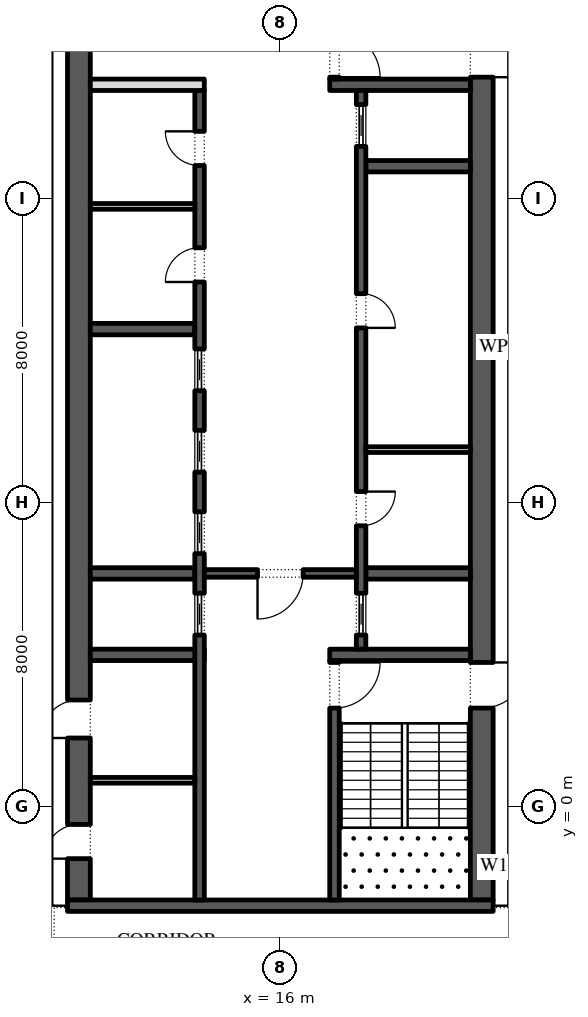
"""IFC4 building model, lengths in metres.
Left out: names, types, materials, properties, quantities, classifications, styles, units other than length and angle.
Written with IfcOpenShell. Run it as: python <this file> out.ifc"""

import sys

from ifc_helpers import new_model, si_unit, direction, frame, frame_2d, origin, place, context, subcontext, project, spatial, rectangle, extrude, element, fill, save


model = new_model("IFC4")
c1 = context("Model", 3, precision=1e-05, world=origin(), true_north=direction((0.0, 1.0)))
c2 = subcontext(c1, "Body", "Model", "MODEL_VIEW")
j1 = project(units=[si_unit("LENGTHUNIT", "METRE"), si_unit("PLANEANGLEUNIT", "RADIAN")], contexts=[c1])
p1 = place(None, origin())
s1 = spatial("IfcSite", under=j1, at=p1, CompositionType="ELEMENT")
p2 = place(p1, origin())
s2 = spatial("IfcBuilding", under=s1, at=p2, CompositionType="ELEMENT")
p3 = place(p2, frame((0.0, 0.0, 285.0)))
s3 = spatial("IfcBuildingStorey", under=s2, at=p3, CompositionType="ELEMENT", Elevation=285.0)
p4 = place(p3, frame((21.359, -11.678, 0.0), z_axis=(0.0, 0.0, 1.0), x_axis=(0.224949198343, 0.974370493275, 0.0)))
e1 = element("IfcWall", 1, at=p4, inside=s3, PredefinedType="STANDARD", context=c2, shape_type="SweptSolid", body=[
    extrude(rectangle(XDim=49.5, YDim=0.3, at=frame_2d((24.75, 0.0))), origin(), (0.0, 0.0, 1.0), 4.0),
])
p5 = place(p4, frame((1.157, 0.0, 0.45)))
e2 = element("IfcOpeningElement", 2, at=p5, cuts=e1, PredefinedType="OPENING", context=c2, shape_type="SweptSolid", body=[
    extrude(rectangle(XDim=4.5, YDim=3.05, at=frame_2d((2.25, 1.525))), frame((0.0, 0.16, 0.0), z_axis=(0.0, -1.0, 0.0), x_axis=(1.0, 0.0, 0.0)), (0.0, 0.0, 1.0), 0.32),
])
p6 = place(p4, frame((8.121, 0.0, 0.45)))
e3 = element("IfcOpeningElement", 3, at=p6, cuts=e1, PredefinedType="OPENING", context=c2, shape_type="SweptSolid", body=[
    extrude(rectangle(XDim=4.5, YDim=3.05, at=frame_2d((2.25, 1.525))), frame((0.0, 0.16, 0.0), z_axis=(0.0, -1.0, 0.0), x_axis=(1.0, 0.0, 0.0)), (0.0, 0.0, 1.0), 0.32),
])
p7 = place(p4, frame((15.236, 0.0, 0.45)))
e4 = element("IfcOpeningElement", 4, at=p7, cuts=e1, PredefinedType="OPENING", context=c2, shape_type="SweptSolid", body=[
    extrude(rectangle(XDim=4.5, YDim=3.05, at=frame_2d((2.25, 1.525))), frame((0.0, 0.16, 0.0), z_axis=(0.0, -1.0, 0.0), x_axis=(1.0, 0.0, 0.0)), (0.0, 0.0, 1.0), 0.32),
])
p8 = place(p4, frame((22.35, 0.0, 0.45)))
e5 = element("IfcOpeningElement", 5, at=p8, cuts=e1, PredefinedType="OPENING", context=c2, shape_type="SweptSolid", body=[
    extrude(rectangle(XDim=4.5, YDim=3.05, at=frame_2d((2.25, 1.525))), frame((0.0, 0.16, 0.0), z_axis=(0.0, -1.0, 0.0), x_axis=(1.0, 0.0, 0.0)), (0.0, 0.0, 1.0), 0.32),
])
p9 = place(p4, frame((29.464, 0.0, 0.45)))
e6 = element("IfcOpeningElement", 6, at=p9, cuts=e1, PredefinedType="OPENING", context=c2, shape_type="SweptSolid", body=[
    extrude(rectangle(XDim=4.5, YDim=2.95, at=frame_2d((2.25, 1.475))), frame((0.0, 0.16, 0.0), z_axis=(0.0, -1.0, 0.0), x_axis=(1.0, 0.0, 0.0)), (0.0, 0.0, 1.0), 0.32),
])
p10 = place(p4, frame((37.628, 0.0, 0.0)))
e7 = element("IfcOpeningElement", 7, at=p10, cuts=e1, PredefinedType="OPENING", context=c2, shape_type="SweptSolid", body=[
    extrude(rectangle(XDim=2.4, YDim=3.325, at=frame_2d((1.2, 1.663))), frame((0.0, 0.16, 0.0), z_axis=(0.0, -1.0, 0.0), x_axis=(1.0, 0.0, 0.0)), (0.0, 0.0, 1.0), 0.32),
])
p11 = place(p4, frame((43.693, 0.0, 0.45)))
e8 = element("IfcOpeningElement", 8, at=p11, cuts=e1, PredefinedType="OPENING", context=c2, shape_type="SweptSolid", body=[
    extrude(rectangle(XDim=4.5, YDim=3.05, at=frame_2d((2.25, 1.525))), frame((0.0, 0.16, 0.0), z_axis=(0.0, -1.0, 0.0), x_axis=(1.0, 0.0, 0.0)), (0.0, 0.0, 1.0), 0.32),
])
p12 = place(p3, frame((21.3, -2.45, 0.0), z_axis=(0.0, 0.0, 1.0), x_axis=(0.0, 1.0, 0.0)))
e9 = element("IfcWall", 9, at=p12, inside=s3, PredefinedType="SHEAR", context=c2, shape_type="SweptSolid", body=[
    extrude(rectangle(XDim=27.9, YDim=0.6, at=frame_2d((13.95, 0.0))), origin(), (0.0, 0.0, 1.0), 4.0),
])
p13 = place(p12, frame((5.05, 0.0, 0.0)))
e10 = element("IfcOpeningElement", 10, at=p13, cuts=e9, PredefinedType="OPENING", context=c2, shape_type="SweptSolid", body=[
    extrude(rectangle(XDim=1.2, YDim=2.1, at=frame_2d((0.6, 1.05))), frame((0.0, 0.31, 0.0), z_axis=(0.0, -1.0, 0.0), x_axis=(1.0, 0.0, 0.0)), (0.0, 0.0, 1.0), 0.62),
])
p14 = place(p12, frame((21.65, 0.0, 0.0)))
e11 = element("IfcOpeningElement", 11, at=p14, cuts=e9, PredefinedType="OPENING", context=c2, shape_type="SweptSolid", body=[
    extrude(rectangle(XDim=1.2, YDim=2.1, at=frame_2d((0.6, 1.05))), frame((0.0, 0.31, 0.0), z_axis=(0.0, -1.0, 0.0), x_axis=(1.0, 0.0, 0.0)), (0.0, 0.0, 1.0), 0.62),
])
p15 = place(p3, frame((10.7, -2.45, 0.0), z_axis=(0.0, 0.0, 1.0), x_axis=(0.0, 1.0, 0.0)))
e12 = element("IfcWall", 12, at=p15, inside=s3, PredefinedType="SHEAR", context=c2, shape_type="SweptSolid", body=[
    extrude(rectangle(XDim=27.9, YDim=0.6, at=frame_2d((13.95, 0.0))), origin(), (0.0, 0.0, 1.0), 4.0),
])
p16 = place(p15, frame((23.65, 0.0, 0.0)))
e13 = element("IfcOpeningElement", 13, at=p16, cuts=e12, PredefinedType="OPENING", context=c2, shape_type="SweptSolid", body=[
    extrude(rectangle(XDim=2.4, YDim=2.1, at=frame_2d((1.2, 1.05))), frame((0.0, 0.31, 0.0), z_axis=(0.0, -1.0, 0.0), x_axis=(1.0, 0.0, 0.0)), (0.0, 0.0, 1.0), 0.62),
])
p17 = place(p15, frame((1.087, 0.0, 0.0)))
e14 = element("IfcOpeningElement", 14, at=p17, cuts=e12, PredefinedType="OPENING", context=c2, shape_type="SweptSolid", body=[
    extrude(rectangle(XDim=0.9, YDim=2.1, at=frame_2d((0.45, 1.05))), frame((0.0, 0.31, 0.0), z_axis=(0.0, -1.0, 0.0), x_axis=(1.0, 0.0, 0.0)), (0.0, 0.0, 1.0), 0.62),
])
p18 = place(p15, frame((4.262, 0.0, 0.0)))
e15 = element("IfcOpeningElement", 15, at=p18, cuts=e12, PredefinedType="OPENING", context=c2, shape_type="SweptSolid", body=[
    extrude(rectangle(XDim=1.0, YDim=2.1, at=frame_2d((0.5, 1.05))), frame((0.0, 0.31, 0.0), z_axis=(0.0, -1.0, 0.0), x_axis=(1.0, 0.0, 0.0)), (0.0, 0.0, 1.0), 0.62),
])
p19 = place(p3, frame((10.4, -2.6, 0.0), z_axis=(0.0, 0.0, 1.0), x_axis=(1.0, 0.0, 0.0)))
e16 = element("IfcWall", 16, at=p19, inside=s3, PredefinedType="SHEAR", context=c2, shape_type="SweptSolid", body=[
    extrude(rectangle(XDim=11.2, YDim=0.3, at=frame_2d((5.6, 0.0))), origin(), (0.0, 0.0, 1.0), 4.0),
])
p20 = place(p3, frame((17.3, 4.0, 0.0), z_axis=(0.0, 0.0, 1.0), x_axis=(1.0, 0.0, 0.0)))
e17 = element("IfcWall", 17, at=p20, inside=s3, PredefinedType="SHEAR", context=c2, shape_type="SweptSolid", body=[
    extrude(rectangle(XDim=3.7, YDim=0.3, at=frame_2d((1.85, 0.0))), origin(), (0.0, 0.0, 1.0), 4.0),
])
p21 = place(p3, frame((17.425, -2.45, 0.0), z_axis=(0.0, 0.0, 1.0), x_axis=(0.0, 1.0, 0.0)))
e18 = element("IfcWall", 18, at=p21, inside=s3, PredefinedType="SHEAR", context=c2, shape_type="SweptSolid", body=[
    extrude(rectangle(XDim=6.3, YDim=0.25, at=frame_2d((3.15, 0.0))), origin(), (0.0, 0.0, 1.0), 4.0),
])
p22 = place(p21, frame((5.05, 0.0, 0.0)))
e19 = element("IfcOpeningElement", 19, at=p22, cuts=e18, PredefinedType="OPENING", context=c2, shape_type="SweptSolid", body=[
    extrude(rectangle(XDim=1.2, YDim=2.1, at=frame_2d((0.6, 1.05))), frame((0.0, 0.135, 0.0), z_axis=(0.0, -1.0, 0.0), x_axis=(1.0, 0.0, 0.0)), (0.0, 0.0, 1.0), 0.27),
])
p23 = place(p3, frame((17.3, 19.0, 0.0), z_axis=(0.0, 0.0, 1.0), x_axis=(1.0, 0.0, 0.0)))
e20 = element("IfcWall", 20, at=p23, inside=s3, PredefinedType="SHEAR", context=c2, shape_type="SweptSolid", body=[
    extrude(rectangle(XDim=3.7, YDim=0.3, at=frame_2d((1.85, 0.0))), origin(), (0.0, 0.0, 1.0), 4.0),
])
p24 = place(p3, frame((17.425, 19.15, 0.0), z_axis=(0.0, 0.0, 1.0), x_axis=(0.0, 1.0, 0.0)))
e21 = element("IfcWall", 21, at=p24, inside=s3, PredefinedType="SHEAR", context=c2, shape_type="SweptSolid", body=[
    extrude(rectangle(XDim=6.3, YDim=0.25, at=frame_2d((3.15, 0.0))), origin(), (0.0, 0.0, 1.0), 4.0),
])
p25 = place(p24, frame((0.05, 0.0, 0.0)))
e22 = element("IfcOpeningElement", 22, at=p25, cuts=e21, PredefinedType="OPENING", context=c2, shape_type="SweptSolid", body=[
    extrude(rectangle(XDim=1.2, YDim=2.1, at=frame_2d((0.6, 1.05))), frame((0.0, 0.135, 0.0), z_axis=(0.0, -1.0, 0.0), x_axis=(1.0, 0.0, 0.0)), (0.0, 0.0, 1.0), 0.27),
])
for number, where, z_axis, x_axis in (
    (23, (18.25, 6.143, 0.0), (0.0, 0.0, 1.0), (1.0, 0.0, 0.0)),
    (24, (18.25, 16.857, 0.0), (0.0, 0.0, 1.0), (1.0, 0.0, 0.0)),
):
    element("IfcWall", number, at=place(p3, frame(where, z_axis=z_axis, x_axis=x_axis)), inside=s3, PredefinedType="SHEAR", context=c2, shape_type="SweptSolid", body=[
        extrude(rectangle(XDim=2.75, YDim=0.3, at=frame_2d((1.375, 0.0))), origin(), (0.0, 0.0, 1.0), 4.0),
    ])
p26 = place(p3, frame((18.125, 4.15, 0.0), z_axis=(0.0, 0.0, 1.0), x_axis=(0.0, 1.0, 0.0)))
e25 = element("IfcWall", 25, at=p26, inside=s3, PredefinedType="SHEAR", context=c2, shape_type="SweptSolid", body=[
    extrude(rectangle(XDim=14.7, YDim=0.25, at=frame_2d((7.35, 0.0))), origin(), (0.0, 0.0, 1.0), 4.0),
])
p27 = place(p26, frame((3.246, 0.0, 0.0)))
e26 = element("IfcOpeningElement", 26, at=p27, cuts=e25, PredefinedType="OPENING", context=c2, shape_type="SweptSolid", body=[
    extrude(rectangle(XDim=0.9, YDim=2.1, at=frame_2d((0.45, 1.05))), frame((0.0, 0.135, 0.0), z_axis=(0.0, -1.0, 0.0), x_axis=(1.0, 0.0, 0.0)), (0.0, 0.0, 1.0), 0.27),
])
p28 = place(p26, frame((8.454, 0.0, 0.0)))
e27 = element("IfcOpeningElement", 27, at=p28, cuts=e25, PredefinedType="OPENING", context=c2, shape_type="SweptSolid", body=[
    extrude(rectangle(XDim=0.9, YDim=2.1, at=frame_2d((0.45, 1.05))), frame((0.0, 0.135, 0.0), z_axis=(0.0, -1.0, 0.0), x_axis=(1.0, 0.0, 0.0)), (0.0, 0.0, 1.0), 0.27),
])
p29 = place(p26, frame((0.371, 0.0, 0.0)))
e28 = element("IfcOpeningElement", 28, at=p29, cuts=e25, PredefinedType="OPENING", context=c2, shape_type="SweptSolid", body=[
    extrude(rectangle(XDim=1.1, YDim=2.1, at=frame_2d((0.55, 1.05))), frame((0.0, 0.135, 0.0), z_axis=(0.0, -1.0, 0.0), x_axis=(1.0, 0.0, 0.0)), (0.0, 0.0, 1.0), 0.27),
])
p30 = place(p26, frame((13.229, 0.0, 0.0)))
e29 = element("IfcOpeningElement", 29, at=p30, cuts=e25, PredefinedType="OPENING", context=c2, shape_type="SweptSolid", body=[
    extrude(rectangle(XDim=1.1, YDim=2.1, at=frame_2d((0.55, 1.05))), frame((0.0, 0.135, 0.0), z_axis=(0.0, -1.0, 0.0), x_axis=(1.0, 0.0, 0.0)), (0.0, 0.0, 1.0), 0.27),
])
p31 = place(p3, frame((18.25, 9.4, 0.0), z_axis=(0.0, 0.0, 1.0), x_axis=(1.0, 0.0, 0.0)))
e30 = element("IfcWall", 30, at=p31, inside=s3, PredefinedType="PARTITIONING", context=c2, shape_type="SweptSolid", body=[
    extrude(rectangle(XDim=2.75, YDim=0.15, at=frame_2d((1.375, 0.0))), origin(), (0.0, 0.0, 1.0), 4.0),
])
p32 = place(p3, frame((11.0, 4.0, 0.0), z_axis=(0.0, 0.0, 1.0), x_axis=(1.0, 0.0, 0.0)))
e31 = element("IfcWall", 31, at=p32, inside=s3, PredefinedType="SHEAR", context=c2, shape_type="SweptSolid", body=[
    extrude(rectangle(XDim=3.0, YDim=0.3, at=frame_2d((1.5, 0.0))), origin(), (0.0, 0.0, 1.0), 4.0),
])
for number, where, z_axis, x_axis in (
    (32, (11.0, 6.143, 0.0), (0.0, 0.0, 1.0), (1.0, 0.0, 0.0)),
    (33, (11.0, 12.571, 0.0), (0.0, 0.0, 1.0), (1.0, 0.0, 0.0)),
):
    element("IfcWall", number, at=place(p3, frame(where, z_axis=z_axis, x_axis=x_axis)), inside=s3, PredefinedType="SHEAR", context=c2, shape_type="SweptSolid", body=[
        extrude(rectangle(XDim=2.75, YDim=0.3, at=frame_2d((1.375, 0.0))), origin(), (0.0, 0.0, 1.0), 4.0),
    ])
p33 = place(p3, frame((13.875, -2.45, 0.0), z_axis=(0.0, 0.0, 1.0), x_axis=(0.0, 1.0, 0.0)))
e34 = element("IfcWall", 34, at=p33, inside=s3, PredefinedType="SHEAR", context=c2, shape_type="SweptSolid", body=[
    extrude(rectangle(XDim=21.3, YDim=0.25, at=frame_2d((10.65, 0.0))), origin(), (0.0, 0.0, 1.0), 4.0),
])
p34 = place(p33, frame((16.261, 0.0, 0.0)))
e35 = element("IfcOpeningElement", 35, at=p34, cuts=e34, PredefinedType="OPENING", context=c2, shape_type="SweptSolid", body=[
    extrude(rectangle(XDim=0.9, YDim=2.1, at=frame_2d((0.45, 1.05))), frame((0.0, 0.135, 0.0), z_axis=(0.0, -1.0, 0.0), x_axis=(1.0, 0.0, 0.0)), (0.0, 0.0, 1.0), 0.27),
])
p35 = place(p33, frame((19.325, 0.0, 0.0)))
e36 = element("IfcOpeningElement", 36, at=p35, cuts=e34, PredefinedType="OPENING", context=c2, shape_type="SweptSolid", body=[
    extrude(rectangle(XDim=0.9, YDim=2.1, at=frame_2d((0.45, 1.05))), frame((0.0, 0.135, 0.0), z_axis=(0.0, -1.0, 0.0), x_axis=(1.0, 0.0, 0.0)), (0.0, 0.0, 1.0), 0.27),
])
p36 = place(p33, frame((6.971, 0.0, 0.0)))
e37 = element("IfcOpeningElement", 37, at=p36, cuts=e34, PredefinedType="OPENING", context=c2, shape_type="SweptSolid", body=[
    extrude(rectangle(XDim=1.1, YDim=2.1, at=frame_2d((0.55, 1.05))), frame((0.0, 0.135, 0.0), z_axis=(0.0, -1.0, 0.0), x_axis=(1.0, 0.0, 0.0)), (0.0, 0.0, 1.0), 0.27),
])
p37 = place(p33, frame((9.114, 0.0, 0.0)))
e38 = element("IfcOpeningElement", 38, at=p37, cuts=e34, PredefinedType="OPENING", context=c2, shape_type="SweptSolid", body=[
    extrude(rectangle(XDim=1.1, YDim=2.1, at=frame_2d((0.55, 1.05))), frame((0.0, 0.135, 0.0), z_axis=(0.0, -1.0, 0.0), x_axis=(1.0, 0.0, 0.0)), (0.0, 0.0, 1.0), 0.27),
])
p38 = place(p33, frame((11.257, 0.0, 0.0)))
e39 = element("IfcOpeningElement", 39, at=p38, cuts=e34, PredefinedType="OPENING", context=c2, shape_type="SweptSolid", body=[
    extrude(rectangle(XDim=1.1, YDim=2.1, at=frame_2d((0.55, 1.05))), frame((0.0, 0.135, 0.0), z_axis=(0.0, -1.0, 0.0), x_axis=(1.0, 0.0, 0.0)), (0.0, 0.0, 1.0), 0.27),
])
p39 = place(p33, frame((13.4, 0.0, 0.0)))
e40 = element("IfcOpeningElement", 40, at=p39, cuts=e34, PredefinedType="OPENING", context=c2, shape_type="SweptSolid", body=[
    extrude(rectangle(XDim=1.1, YDim=2.1, at=frame_2d((0.55, 1.05))), frame((0.0, 0.135, 0.0), z_axis=(0.0, -1.0, 0.0), x_axis=(1.0, 0.0, 0.0)), (0.0, 0.0, 1.0), 0.27),
])
p40 = place(p3, frame((11.0, 19.0, 0.0), z_axis=(0.0, 0.0, 1.0), x_axis=(1.0, 0.0, 0.0)))
e41 = element("IfcWall", 41, at=p40, inside=s3, PredefinedType="PARTITIONING", context=c2, shape_type="SweptSolid", body=[
    extrude(rectangle(XDim=3.0, YDim=0.3, at=frame_2d((1.5, 0.0))), origin(), (0.0, 0.0, 1.0), 4.0),
])
p41 = place(p3, frame((11.0, 15.8, 0.0), z_axis=(0.0, 0.0, 1.0), x_axis=(1.0, 0.0, 0.0)))
e42 = element("IfcWall", 42, at=p41, inside=s3, PredefinedType="PARTITIONING", context=c2, shape_type="SweptSolid", body=[
    extrude(rectangle(XDim=2.75, YDim=0.15, at=frame_2d((1.375, 0.0))), origin(), (0.0, 0.0, 1.0), 4.0),
])
p42 = place(p3, frame((14.0, 6.143, 0.0), z_axis=(0.0, 0.0, 1.0), x_axis=(1.0, 0.0, 0.0)))
e43 = element("IfcWall", 43, at=p42, inside=s3, PredefinedType="SHEAR", context=c2, shape_type="SweptSolid", body=[
    extrude(rectangle(XDim=4.0, YDim=0.2, at=frame_2d((2.0, 0.0))), origin(), (0.0, 0.0, 1.0), 4.0),
])
p43 = place(p42, frame((1.4, 0.0, 0.0)))
e44 = element("IfcOpeningElement", 44, at=p43, cuts=e43, PredefinedType="OPENING", context=c2, shape_type="SweptSolid", body=[
    extrude(rectangle(XDim=1.2, YDim=2.1, at=frame_2d((0.6, 1.05))), frame((0.0, 0.11, 0.0), z_axis=(0.0, -1.0, 0.0), x_axis=(1.0, 0.0, 0.0)), (0.0, 0.0, 1.0), 0.22),
])
p44 = place(p3, frame((11.0, 0.7, 0.0), z_axis=(0.0, 0.0, 1.0), x_axis=(1.0, 0.0, 0.0)))
e45 = element("IfcWall", 45, at=p44, inside=s3, PredefinedType="PARTITIONING", context=c2, shape_type="SweptSolid", body=[
    extrude(rectangle(XDim=2.75, YDim=0.15, at=frame_2d((1.375, 0.0))), origin(), (0.0, 0.0, 1.0), 4.0),
])
p45 = place(p27, frame((0.9, -0.2, 0.0), z_axis=(0.0, 0.0, 1.0), x_axis=(-1.0, 0.0, 0.0)))
e46 = element("IfcDoor", 46, at=p45, inside=s3, OperationType="SINGLE_SWING_RIGHT", PredefinedType="DOOR", context=c2, shape_type="SweptSolid", body=[
    extrude(rectangle(XDim=0.9, YDim=2.1, at=frame_2d((0.45, 1.05))), frame((0.0, -0.075, 0.0), z_axis=(0.0, -1.0, 0.0), x_axis=(1.0, 0.0, 0.0)), (0.0, 0.0, 1.0), 0.05),
])
fill(e26, e46)
p46 = place(p28, frame((0.9, -0.2, 0.0), z_axis=(0.0, 0.0, 1.0), x_axis=(-1.0, 0.0, 0.0)))
e47 = element("IfcDoor", 47, at=p46, inside=s3, OperationType="SINGLE_SWING_LEFT", PredefinedType="DOOR", context=c2, shape_type="SweptSolid", body=[
    extrude(rectangle(XDim=0.9, YDim=2.1, at=frame_2d((0.45, 1.05))), frame((0.0, -0.075, 0.0), z_axis=(0.0, -1.0, 0.0), x_axis=(1.0, 0.0, 0.0)), (0.0, 0.0, 1.0), 0.05),
])
fill(e27, e47)
p47 = place(p29, origin())
e48 = element("IfcDoor", 48, at=p47, inside=s3, OperationType="SLIDING_TO_LEFT", PredefinedType="DOOR", context=c2, shape_type="SweptSolid", body=[
    extrude(rectangle(XDim=1.1, YDim=2.1, at=frame_2d((0.55, 1.05))), frame((0.0, 0.025, 0.0), z_axis=(0.0, -1.0, 0.0), x_axis=(1.0, 0.0, 0.0)), (0.0, 0.0, 1.0), 0.05),
])
fill(e28, e48)
p48 = place(p30, origin())
e49 = element("IfcDoor", 49, at=p48, inside=s3, OperationType="SLIDING_TO_LEFT", PredefinedType="DOOR", context=c2, shape_type="SweptSolid", body=[
    extrude(rectangle(XDim=1.1, YDim=2.1, at=frame_2d((0.55, 1.05))), frame((0.0, 0.025, 0.0), z_axis=(0.0, -1.0, 0.0), x_axis=(1.0, 0.0, 0.0)), (0.0, 0.0, 1.0), 0.05),
])
fill(e29, e49)
p49 = place(p34, origin())
e50 = element("IfcDoor", 50, at=p49, inside=s3, OperationType="SINGLE_SWING_RIGHT", PredefinedType="DOOR", context=c2, shape_type="SweptSolid", body=[
    extrude(rectangle(XDim=0.9, YDim=2.1, at=frame_2d((0.45, 1.05))), frame((0.0, 0.125, 0.0), z_axis=(0.0, -1.0, 0.0), x_axis=(1.0, 0.0, 0.0)), (0.0, 0.0, 1.0), 0.05),
])
fill(e35, e50)
p50 = place(p35, origin())
e51 = element("IfcDoor", 51, at=p50, inside=s3, OperationType="SINGLE_SWING_LEFT", PredefinedType="DOOR", context=c2, shape_type="SweptSolid", body=[
    extrude(rectangle(XDim=0.9, YDim=2.1, at=frame_2d((0.45, 1.05))), frame((0.0, 0.125, 0.0), z_axis=(0.0, -1.0, 0.0), x_axis=(1.0, 0.0, 0.0)), (0.0, 0.0, 1.0), 0.05),
])
fill(e36, e51)
p51 = place(p36, origin())
e52 = element("IfcDoor", 52, at=p51, inside=s3, OperationType="SLIDING_TO_LEFT", PredefinedType="DOOR", context=c2, shape_type="SweptSolid", body=[
    extrude(rectangle(XDim=1.1, YDim=2.1, at=frame_2d((0.55, 1.05))), frame((0.0, 0.025, 0.0), z_axis=(0.0, -1.0, 0.0), x_axis=(1.0, 0.0, 0.0)), (0.0, 0.0, 1.0), 0.05),
])
fill(e37, e52)
p52 = place(p37, origin())
e53 = element("IfcDoor", 53, at=p52, inside=s3, OperationType="SLIDING_TO_LEFT", PredefinedType="DOOR", context=c2, shape_type="SweptSolid", body=[
    extrude(rectangle(XDim=1.1, YDim=2.1, at=frame_2d((0.55, 1.05))), frame((0.0, 0.025, 0.0), z_axis=(0.0, -1.0, 0.0), x_axis=(1.0, 0.0, 0.0)), (0.0, 0.0, 1.0), 0.05),
])
fill(e38, e53)
p53 = place(p38, origin())
e54 = element("IfcDoor", 54, at=p53, inside=s3, OperationType="SLIDING_TO_LEFT", PredefinedType="DOOR", context=c2, shape_type="SweptSolid", body=[
    extrude(rectangle(XDim=1.1, YDim=2.1, at=frame_2d((0.55, 1.05))), frame((0.0, 0.025, 0.0), z_axis=(0.0, -1.0, 0.0), x_axis=(1.0, 0.0, 0.0)), (0.0, 0.0, 1.0), 0.05),
])
fill(e39, e54)
p54 = place(p39, origin())
e55 = element("IfcDoor", 55, at=p54, inside=s3, OperationType="SLIDING_TO_LEFT", PredefinedType="DOOR", context=c2, shape_type="SweptSolid", body=[
    extrude(rectangle(XDim=1.1, YDim=2.1, at=frame_2d((0.55, 1.05))), frame((0.0, 0.025, 0.0), z_axis=(0.0, -1.0, 0.0), x_axis=(1.0, 0.0, 0.0)), (0.0, 0.0, 1.0), 0.05),
])
fill(e40, e55)
p55 = place(p43, frame((1.2, 0.0, 0.0), z_axis=(0.0, 0.0, 1.0), x_axis=(-1.0, 0.0, 0.0)))
e56 = element("IfcDoor", 56, at=p55, inside=s3, OperationType="SINGLE_SWING_LEFT", PredefinedType="DOOR", context=c2, shape_type="SweptSolid", body=[
    extrude(rectangle(XDim=1.2, YDim=2.1, at=frame_2d((0.6, 1.05))), frame((0.0, 0.025, 0.0), z_axis=(0.0, -1.0, 0.0), x_axis=(1.0, 0.0, 0.0)), (0.0, 0.0, 1.0), 0.05),
])
fill(e44, e56)
p56 = place(p22, frame((1.2, 0.0, 0.0), z_axis=(0.0, 0.0, 1.0), x_axis=(-1.0, 0.0, 0.0)))
e57 = element("IfcDoor", 57, at=p56, inside=s3, OperationType="SINGLE_SWING_RIGHT", PredefinedType="DOOR", context=c2, shape_type="SweptSolid", body=[
    extrude(rectangle(XDim=1.2, YDim=2.1, at=frame_2d((0.6, 1.05))), frame((0.0, 0.025, 0.0), z_axis=(0.0, -1.0, 0.0), x_axis=(1.0, 0.0, 0.0)), (0.0, 0.0, 1.0), 0.05),
])
fill(e19, e57)
p57 = place(p13, frame((1.2, 0.0, 0.0), z_axis=(0.0, 0.0, 1.0), x_axis=(-1.0, 0.0, 0.0)))
e58 = element("IfcDoor", 58, at=p57, inside=s3, OperationType="SINGLE_SWING_RIGHT", PredefinedType="DOOR", context=c2, shape_type="SweptSolid", body=[
    extrude(rectangle(XDim=1.2, YDim=2.1, at=frame_2d((0.6, 1.05))), frame((0.0, 0.025, 0.0), z_axis=(0.0, -1.0, 0.0), x_axis=(1.0, 0.0, 0.0)), (0.0, 0.0, 1.0), 0.05),
])
fill(e10, e58)
p58 = place(p25, frame((1.2, 0.0, 0.0), z_axis=(0.0, 0.0, 1.0), x_axis=(-1.0, 0.0, 0.0)))
e59 = element("IfcDoor", 59, at=p58, inside=s3, OperationType="SINGLE_SWING_LEFT", PredefinedType="DOOR", context=c2, shape_type="SweptSolid", body=[
    extrude(rectangle(XDim=1.2, YDim=2.1, at=frame_2d((0.6, 1.05))), frame((0.0, 0.025, 0.0), z_axis=(0.0, -1.0, 0.0), x_axis=(1.0, 0.0, 0.0)), (0.0, 0.0, 1.0), 0.05),
])
fill(e22, e59)
p59 = place(p14, frame((1.2, 0.0, 0.0), z_axis=(0.0, 0.0, 1.0), x_axis=(-1.0, 0.0, 0.0)))
e60 = element("IfcDoor", 60, at=p59, inside=s3, OperationType="SINGLE_SWING_LEFT", PredefinedType="DOOR", context=c2, shape_type="SweptSolid", body=[
    extrude(rectangle(XDim=1.2, YDim=2.1, at=frame_2d((0.6, 1.05))), frame((0.0, 0.025, 0.0), z_axis=(0.0, -1.0, 0.0), x_axis=(1.0, 0.0, 0.0)), (0.0, 0.0, 1.0), 0.05),
])
fill(e11, e60)
p60 = place(p17, origin())
e61 = element("IfcDoor", 61, at=p60, inside=s3, OperationType="SINGLE_SWING_RIGHT", PredefinedType="DOOR", context=c2, shape_type="SweptSolid", body=[
    extrude(rectangle(XDim=0.9, YDim=2.1, at=frame_2d((0.45, 1.05))), frame((0.0, -0.25, 0.0), z_axis=(0.0, -1.0, 0.0), x_axis=(1.0, 0.0, 0.0)), (0.0, 0.0, 1.0), 0.05),
])
fill(e14, e61)
p61 = place(p18, origin())
e62 = element("IfcDoor", 62, at=p61, inside=s3, OperationType="SINGLE_SWING_RIGHT", PredefinedType="DOOR", context=c2, shape_type="SweptSolid", body=[
    extrude(rectangle(XDim=1.0, YDim=2.1, at=frame_2d((0.5, 1.05))), frame((0.0, -0.25, 0.0), z_axis=(0.0, -1.0, 0.0), x_axis=(1.0, 0.0, 0.0)), (0.0, 0.0, 1.0), 0.05),
])
fill(e15, e62)
save(model, sys.argv[1])
